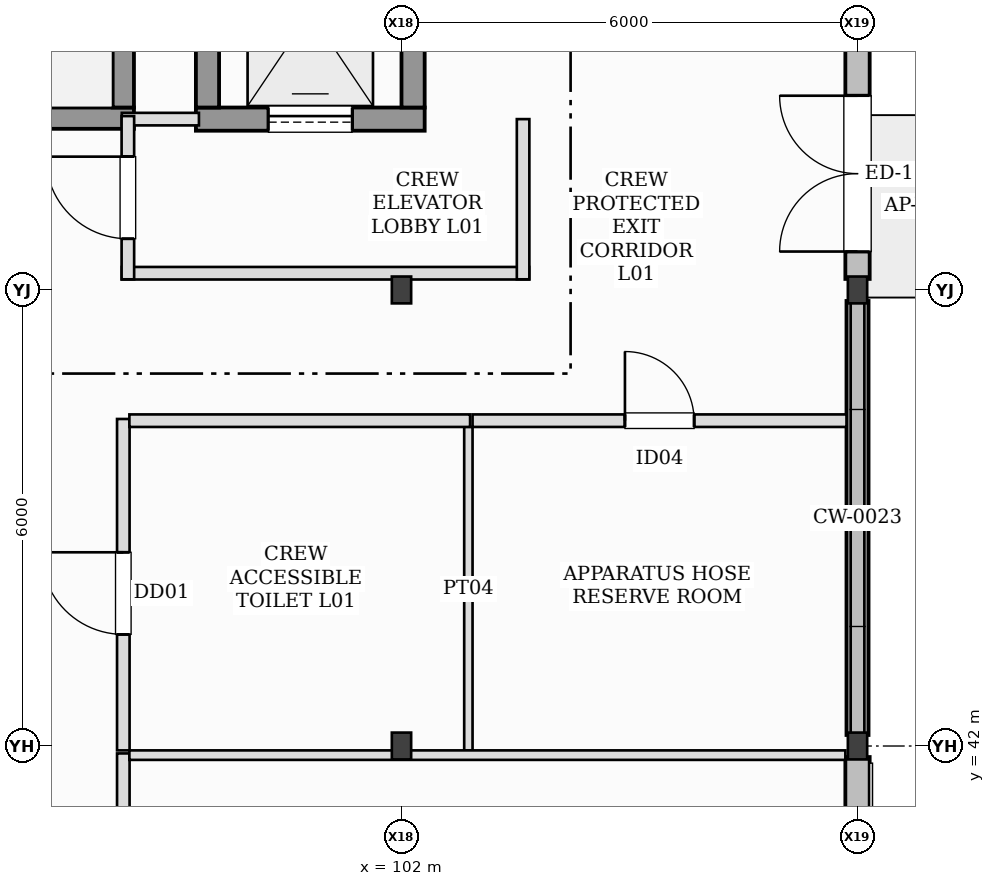
"""IFC4 building model, lengths in metres.
Left out: names, types, materials, properties, quantities, classifications, styles, units other than length and angle.
Written with IfcOpenShell. Run it as: python <this file> out.ifc"""

import sys

from ifc_helpers import new_model, si_unit, direction, frame, frame_2d, origin, origin_2d, place, context, subcontext, project, spatial, rectangle, i_section, extrude, element, fill, save


model = new_model("IFC4")
c1 = context("Model", 3, precision=1e-05, world=origin(), true_north=direction((0.0, 1.0)))
c2 = subcontext(c1, "Body", "Model", "MODEL_VIEW")
j1 = project(units=[si_unit("LENGTHUNIT", "METRE"), si_unit("PLANEANGLEUNIT", "RADIAN")], contexts=[c1])
p1 = place(None, origin())
s1 = spatial("IfcSite", under=j1, at=p1, CompositionType="ELEMENT")
p2 = place(p1, origin())
s2 = spatial("IfcBuilding", under=s1, at=p2, CompositionType="ELEMENT")
p3 = place(p2, origin())
s3 = spatial("IfcBuildingStorey", under=s2, at=p3, CompositionType="ELEMENT", Elevation=0.0)
for number, where, z_axis, x_axis in (
    (1, (102.0, 42.0, -0.41), (0.0, 0.0, 1.0), (1.0, 0.0, 0.0)),
    (2, (102.0, 48.0, -0.41), (0.0, 0.0, 1.0), (1.0, 0.0, 0.0)),
    (3, (108.0, 42.0, -0.41), (0.0, 0.0, 1.0), (1.0, 0.0, 0.0)),
    (4, (108.0, 48.0, -0.41), (0.0, 0.0, 1.0), (1.0, 0.0, 0.0)),
):
    element("IfcColumn", number, at=place(p3, frame(where, z_axis=z_axis, x_axis=x_axis)), inside=s3, PredefinedType="COLUMN", context=c2, shape_type="SweptSolid", body=[
        extrude(i_section(OverallWidth=0.254, OverallDepth=0.353, WebThickness=0.01, FlangeThickness=0.016, at=origin_2d()), origin(), (0.0, 0.0, 1.0), 6.41),
    ])
p4 = place(p3, frame((108.0, 36.145, 0.0), z_axis=(0.0, 0.0, 1.0), x_axis=(0.0, 1.0, 0.0)))
e5 = element("IfcWall", 5, at=p4, inside=s3, PredefinedType="STANDARD", context=c2, shape_type="SweptSolid", body=[
    extrude(rectangle(XDim=5.71, YDim=0.32, at=frame_2d((2.855, 0.0))), origin(), (0.0, 0.0, 1.0), 5.044),
])
p5 = place(p3, frame((108.0, 42.145, 0.0), z_axis=(0.0, 0.0, 1.0), x_axis=(0.0, 1.0, 0.0)))
e6 = element("IfcWall", 6, at=p5, inside=s3, PredefinedType="STANDARD", context=c2, shape_type="SweptSolid", body=[
    extrude(rectangle(XDim=5.71, YDim=0.29, at=frame_2d((2.855, 0.0))), origin(), (0.0, 0.0, 1.0), 0.8),
])
p6 = place(p3, frame((108.0, 48.145, 0.0), z_axis=(0.0, 0.0, 1.0), x_axis=(0.0, 1.0, 0.0)))
e7 = element("IfcWall", 7, at=p6, inside=s3, PredefinedType="STANDARD", context=c2, shape_type="SweptSolid", body=[
    extrude(rectangle(XDim=5.71, YDim=0.32, at=frame_2d((2.855, 0.0))), origin(), (0.0, 0.0, 1.0), 5.044),
])
p7 = place(p6, frame((0.36, 0.0, 0.0)))
e8 = element("IfcOpeningElement", 8, at=p7, cuts=e7, PredefinedType="OPENING", context=c2, shape_type="SweptSolid", body=[
    extrude(rectangle(XDim=2.05, YDim=2.45, at=frame_2d((1.025, 1.225))), frame((0.0, 0.17, 0.0), z_axis=(0.0, -1.0, 0.0), x_axis=(1.0, 0.0, 0.0)), (0.0, 0.0, 1.0), 0.34),
])
p8 = place(p3, frame((90.32, 50.26, 0.0), z_axis=(0.0, 0.0, 1.0), x_axis=(1.0, 0.0, 0.0)))
e9 = element("IfcWall", 9, at=p8, inside=s3, PredefinedType="SHEAR", context=c2, shape_type="SweptSolid", body=[
    extrude(rectangle(XDim=8.16, YDim=0.28, at=frame_2d((4.08, 0.0))), origin(), (0.0, 0.0, 1.0), 6.0),
])
p9 = place(p8, frame((0.65, 0.0, 0.0)))
e10 = element("IfcOpeningElement", 10, at=p9, cuts=e9, PredefinedType="OPENING", context=c2, shape_type="SweptSolid", body=[
    extrude(rectangle(XDim=0.98, YDim=2.15, at=frame_2d((0.49, 1.075))), frame((0.0, 0.15, 0.0), z_axis=(0.0, -1.0, 0.0), x_axis=(1.0, 0.0, 0.0)), (0.0, 0.0, 1.0), 0.3),
])
p10 = place(p3, frame((98.34, 50.4, 0.0), z_axis=(0.0, 0.0, 1.0), x_axis=(0.0, 1.0, 0.0)))
e11 = element("IfcWall", 11, at=p10, inside=s3, PredefinedType="SHEAR", context=c2, shape_type="SweptSolid", body=[
    extrude(rectangle(XDim=3.0, YDim=0.28, at=frame_2d((1.5, 0.0))), origin(), (0.0, 0.0, 1.0), 6.0),
])
p11 = place(p3, frame((99.295, 50.248, 0.0), z_axis=(0.0, 0.0, 1.0), x_axis=(1.0, 0.0, 0.0)))
e12 = element("IfcWall", 12, at=p11, inside=s3, PredefinedType="SHEAR", context=c2, shape_type="SweptSolid", body=[
    extrude(rectangle(XDim=3.01, YDim=0.305, at=frame_2d((1.505, 0.0))), origin(), (0.0, 0.0, 1.0), 6.0),
])
p12 = place(p11, frame((0.955, 0.0, 0.0)))
e13 = element("IfcOpeningElement", 13, at=p12, cuts=e12, PredefinedType="OPENING", context=c2, shape_type="SweptSolid", body=[
    extrude(rectangle(XDim=1.1, YDim=2.15, at=frame_2d((0.55, 1.075))), frame((0.0, 0.162, 0.0), z_axis=(0.0, -1.0, 0.0), x_axis=(1.0, 0.0, 0.0)), (0.0, 0.0, 1.0), 0.325),
])
for number, where, z_axis, x_axis in (
    (14, (99.448, 53.4, 0.0), (0.0, 0.0, 1.0), (0.0, -1.0, 0.0)),
    (15, (102.153, 50.4, 0.0), (0.0, 0.0, 1.0), (0.0, 1.0, 0.0)),
):
    element("IfcWall", number, at=place(p3, frame(where, z_axis=z_axis, x_axis=x_axis)), inside=s3, PredefinedType="SHEAR", context=c2, shape_type="SweptSolid", body=[
        extrude(rectangle(XDim=3.0, YDim=0.305, at=frame_2d((1.5, 0.0))), origin(), (0.0, 0.0, 1.0), 6.0),
    ])
p13 = place(p3, frame((98.32, 48.22, 0.0), z_axis=(0.0, 0.0, 1.0), x_axis=(1.0, 0.0, 0.0)))
e16 = element("IfcWall", 16, at=p13, inside=s3, PredefinedType="PARTITIONING", context=c2, shape_type="SweptSolid", body=[
    extrude(rectangle(XDim=5.36, YDim=0.165, at=frame_2d((2.68, 0.0))), origin(), (0.0, 0.0, 1.0), 5.035),
])
p14 = place(p3, frame((103.6, 48.14, 0.0), z_axis=(0.0, 0.0, 1.0), x_axis=(0.0, 1.0, 0.0)))
e17 = element("IfcWall", 17, at=p14, inside=s3, PredefinedType="PARTITIONING", context=c2, shape_type="SweptSolid", body=[
    extrude(rectangle(XDim=2.108, YDim=0.165, at=frame_2d((1.054, 0.0))), origin(), (0.0, 0.0, 1.0), 5.68),
])
p15 = place(p3, frame((98.32, 50.248, 0.0), z_axis=(0.0, 0.0, 1.0), x_axis=(1.0, 0.0, 0.0)))
e18 = element("IfcWall", 18, at=p15, inside=s3, PredefinedType="PARTITIONING", context=c2, shape_type="SweptSolid", body=[
    extrude(rectangle(XDim=1.015, YDim=0.165, at=frame_2d((0.507, 0.0))), origin(), (0.0, 0.0, 1.0), 5.68),
])
p16 = place(p3, frame((98.4, 48.14, 0.0), z_axis=(0.0, 0.0, 1.0), x_axis=(0.0, 1.0, 0.0)))
e19 = element("IfcWall", 19, at=p16, inside=s3, PredefinedType="PARTITIONING", context=c2, shape_type="SweptSolid", body=[
    extrude(rectangle(XDim=2.148, YDim=0.165, at=frame_2d((1.074, 0.0))), origin(), (0.0, 0.0, 1.0), 5.68),
])
p17 = place(p16, frame((0.534, 0.0, 0.0)))
e20 = element("IfcOpeningElement", 20, at=p17, cuts=e19, PredefinedType="OPENING", context=c2, shape_type="SweptSolid", body=[
    extrude(rectangle(XDim=1.08, YDim=2.14, at=frame_2d((0.54, 1.07))), frame((0.0, 0.093, 0.0), z_axis=(0.0, -1.0, 0.0), x_axis=(1.0, 0.0, 0.0)), (0.0, 0.0, 1.0), 0.185),
])
p18 = place(p3, frame((98.34, 30.147, 0.0), z_axis=(0.0, 0.0, 1.0), x_axis=(0.0, 1.0, 0.0)))
e21 = element("IfcWall", 21, at=p18, inside=s3, PredefinedType="PARTITIONING", context=c2, shape_type="SweptSolid", body=[
    extrude(rectangle(XDim=11.755, YDim=0.165, at=frame_2d((5.877, 0.0))), origin(), (0.0, 0.0, 1.0), 5.294),
])
p19 = place(p18, frame((5.458, 0.0, 0.0)))
e22 = element("IfcOpeningElement", 22, at=p19, cuts=e21, PredefinedType="OPENING", context=c2, shape_type="SweptSolid", body=[
    extrude(rectangle(XDim=1.06, YDim=2.25, at=frame_2d((0.53, 1.125))), frame((0.0, 0.093, 0.0), z_axis=(0.0, -1.0, 0.0), x_axis=(1.0, 0.0, 0.0)), (0.0, 0.0, 1.0), 0.185),
])
p20 = place(p3, frame((98.42, 41.88, 0.0), z_axis=(0.0, 0.0, 1.0), x_axis=(1.0, 0.0, 0.0)))
e23 = element("IfcWall", 23, at=p20, inside=s3, PredefinedType="PARTITIONING", context=c2, shape_type="SweptSolid", body=[
    extrude(rectangle(XDim=9.42, YDim=0.125, at=frame_2d((4.71, 0.0))), origin(), (0.0, 0.0, 1.0), 5.035),
])
p21 = place(p3, frame((98.34, 41.942, 0.0), z_axis=(0.0, 0.0, 1.0), x_axis=(0.0, 1.0, 0.0)))
e24 = element("IfcWall", 24, at=p21, inside=s3, PredefinedType="PARTITIONING", context=c2, shape_type="SweptSolid", body=[
    extrude(rectangle(XDim=4.36, YDim=0.165, at=frame_2d((2.18, 0.0))), origin(), (0.0, 0.0, 1.0), 5.249),
])
p22 = place(p21, frame((1.526, 0.0, 0.0)))
e25 = element("IfcOpeningElement", 25, at=p22, cuts=e24, PredefinedType="OPENING", context=c2, shape_type="SweptSolid", body=[
    extrude(rectangle(XDim=1.08, YDim=2.14, at=frame_2d((0.54, 1.07))), frame((0.0, 0.093, 0.0), z_axis=(0.0, -1.0, 0.0), x_axis=(1.0, 0.0, 0.0)), (0.0, 0.0, 1.0), 0.185),
])
p23 = place(p3, frame((98.42, 46.28, 0.0), z_axis=(0.0, 0.0, 1.0), x_axis=(1.0, 0.0, 0.0)))
e26 = element("IfcWall", 26, at=p23, inside=s3, PredefinedType="PARTITIONING", context=c2, shape_type="SweptSolid", body=[
    extrude(rectangle(XDim=4.483, YDim=0.165, at=frame_2d((2.241, 0.0))), origin(), (0.0, 0.0, 1.0), 5.68),
])
p24 = place(p3, frame((102.88, 46.2, 0.0), z_axis=(0.0, 0.0, 1.0), x_axis=(0.0, -1.0, 0.0)))
e27 = element("IfcWall", 27, at=p24, inside=s3, PredefinedType="PARTITIONING", context=c2, shape_type="SweptSolid", body=[
    extrude(rectangle(XDim=4.258, YDim=0.11, at=frame_2d((2.129, 0.0))), origin(), (0.0, 0.0, 1.0), 5.68),
])
p25 = place(p3, frame((102.935, 46.28, 0.0), z_axis=(0.0, 0.0, 1.0), x_axis=(1.0, 0.0, 0.0)))
e28 = element("IfcWall", 28, at=p25, inside=s3, PredefinedType="PARTITIONING", context=c2, shape_type="SweptSolid", body=[
    extrude(rectangle(XDim=4.92, YDim=0.165, at=frame_2d((2.46, 0.0))), origin(), (0.0, 0.0, 1.0), 5.68),
])
p26 = place(p25, frame((2.005, 0.0, 0.0)))
e29 = element("IfcOpeningElement", 29, at=p26, cuts=e28, PredefinedType="OPENING", context=c2, shape_type="SweptSolid", body=[
    extrude(rectangle(XDim=0.91, YDim=2.1, at=frame_2d((0.455, 1.05))), frame((0.0, 0.093, 0.0), z_axis=(0.0, -1.0, 0.0), x_axis=(1.0, 0.0, 0.0)), (0.0, 0.0, 1.0), 0.185),
])
p27 = place(p7, frame((2.05, 0.0, 0.0), z_axis=(0.0, 0.0, 1.0), x_axis=(-1.0, 0.0, 0.0)))
e30 = element("IfcDoor", 30, at=p27, inside=s3, OperationType="DOUBLE_DOOR_SINGLE_SWING", PredefinedType="DOOR", context=c2, shape_type="SweptSolid", body=[
    extrude(rectangle(XDim=2.05, YDim=2.45, at=frame_2d((1.025, 1.225))), frame((0.0, 0.025, 0.0), z_axis=(0.0, -1.0, 0.0), x_axis=(1.0, 0.0, 0.0)), (0.0, 0.0, 1.0), 0.05),
])
fill(e8, e30)
p28 = place(p12, origin())
e31 = element("IfcDoor", 31, at=p28, inside=s3, OperationType="SLIDING_TO_LEFT", PredefinedType="DOOR", context=c2, shape_type="SweptSolid", body=[
    extrude(rectangle(XDim=1.1, YDim=2.15, at=frame_2d((0.55, 1.075))), frame((0.0, 0.025, 0.0), z_axis=(0.0, -1.0, 0.0), x_axis=(1.0, 0.0, 0.0)), (0.0, 0.0, 1.0), 0.05),
])
fill(e13, e31)
p29 = place(p17, frame((1.08, 0.0, 0.0), z_axis=(0.0, 0.0, 1.0), x_axis=(-1.0, 0.0, 0.0)))
e32 = element("IfcDoor", 32, at=p29, inside=s3, OperationType="SINGLE_SWING_RIGHT", PredefinedType="DOOR", context=c2, shape_type="SweptSolid", body=[
    extrude(rectangle(XDim=1.08, YDim=2.14, at=frame_2d((0.54, 1.07))), frame((0.0, 0.025, 0.0), z_axis=(0.0, -1.0, 0.0), x_axis=(1.0, 0.0, 0.0)), (0.0, 0.0, 1.0), 0.05),
])
fill(e20, e32)
p30 = place(p22, frame((1.08, 0.0, 0.0), z_axis=(0.0, 0.0, 1.0), x_axis=(-1.0, 0.0, 0.0)))
e33 = element("IfcDoor", 33, at=p30, inside=s3, OperationType="SINGLE_SWING_RIGHT", PredefinedType="DOOR", context=c2, shape_type="SweptSolid", body=[
    extrude(rectangle(XDim=1.08, YDim=2.14, at=frame_2d((0.54, 1.07))), frame((0.0, 0.025, 0.0), z_axis=(0.0, -1.0, 0.0), x_axis=(1.0, 0.0, 0.0)), (0.0, 0.0, 1.0), 0.05),
])
fill(e25, e33)
p31 = place(p26, frame((0.91, 0.0, 0.0), z_axis=(0.0, 0.0, 1.0), x_axis=(-1.0, 0.0, 0.0)))
e34 = element("IfcDoor", 34, at=p31, inside=s3, OperationType="SINGLE_SWING_LEFT", PredefinedType="DOOR", context=c2, shape_type="SweptSolid", body=[
    extrude(rectangle(XDim=0.91, YDim=2.1, at=frame_2d((0.455, 1.05))), frame((0.0, 0.025, 0.0), z_axis=(0.0, -1.0, 0.0), x_axis=(1.0, 0.0, 0.0)), (0.0, 0.0, 1.0), 0.05),
])
fill(e29, e34)
save(model, sys.argv[1])
